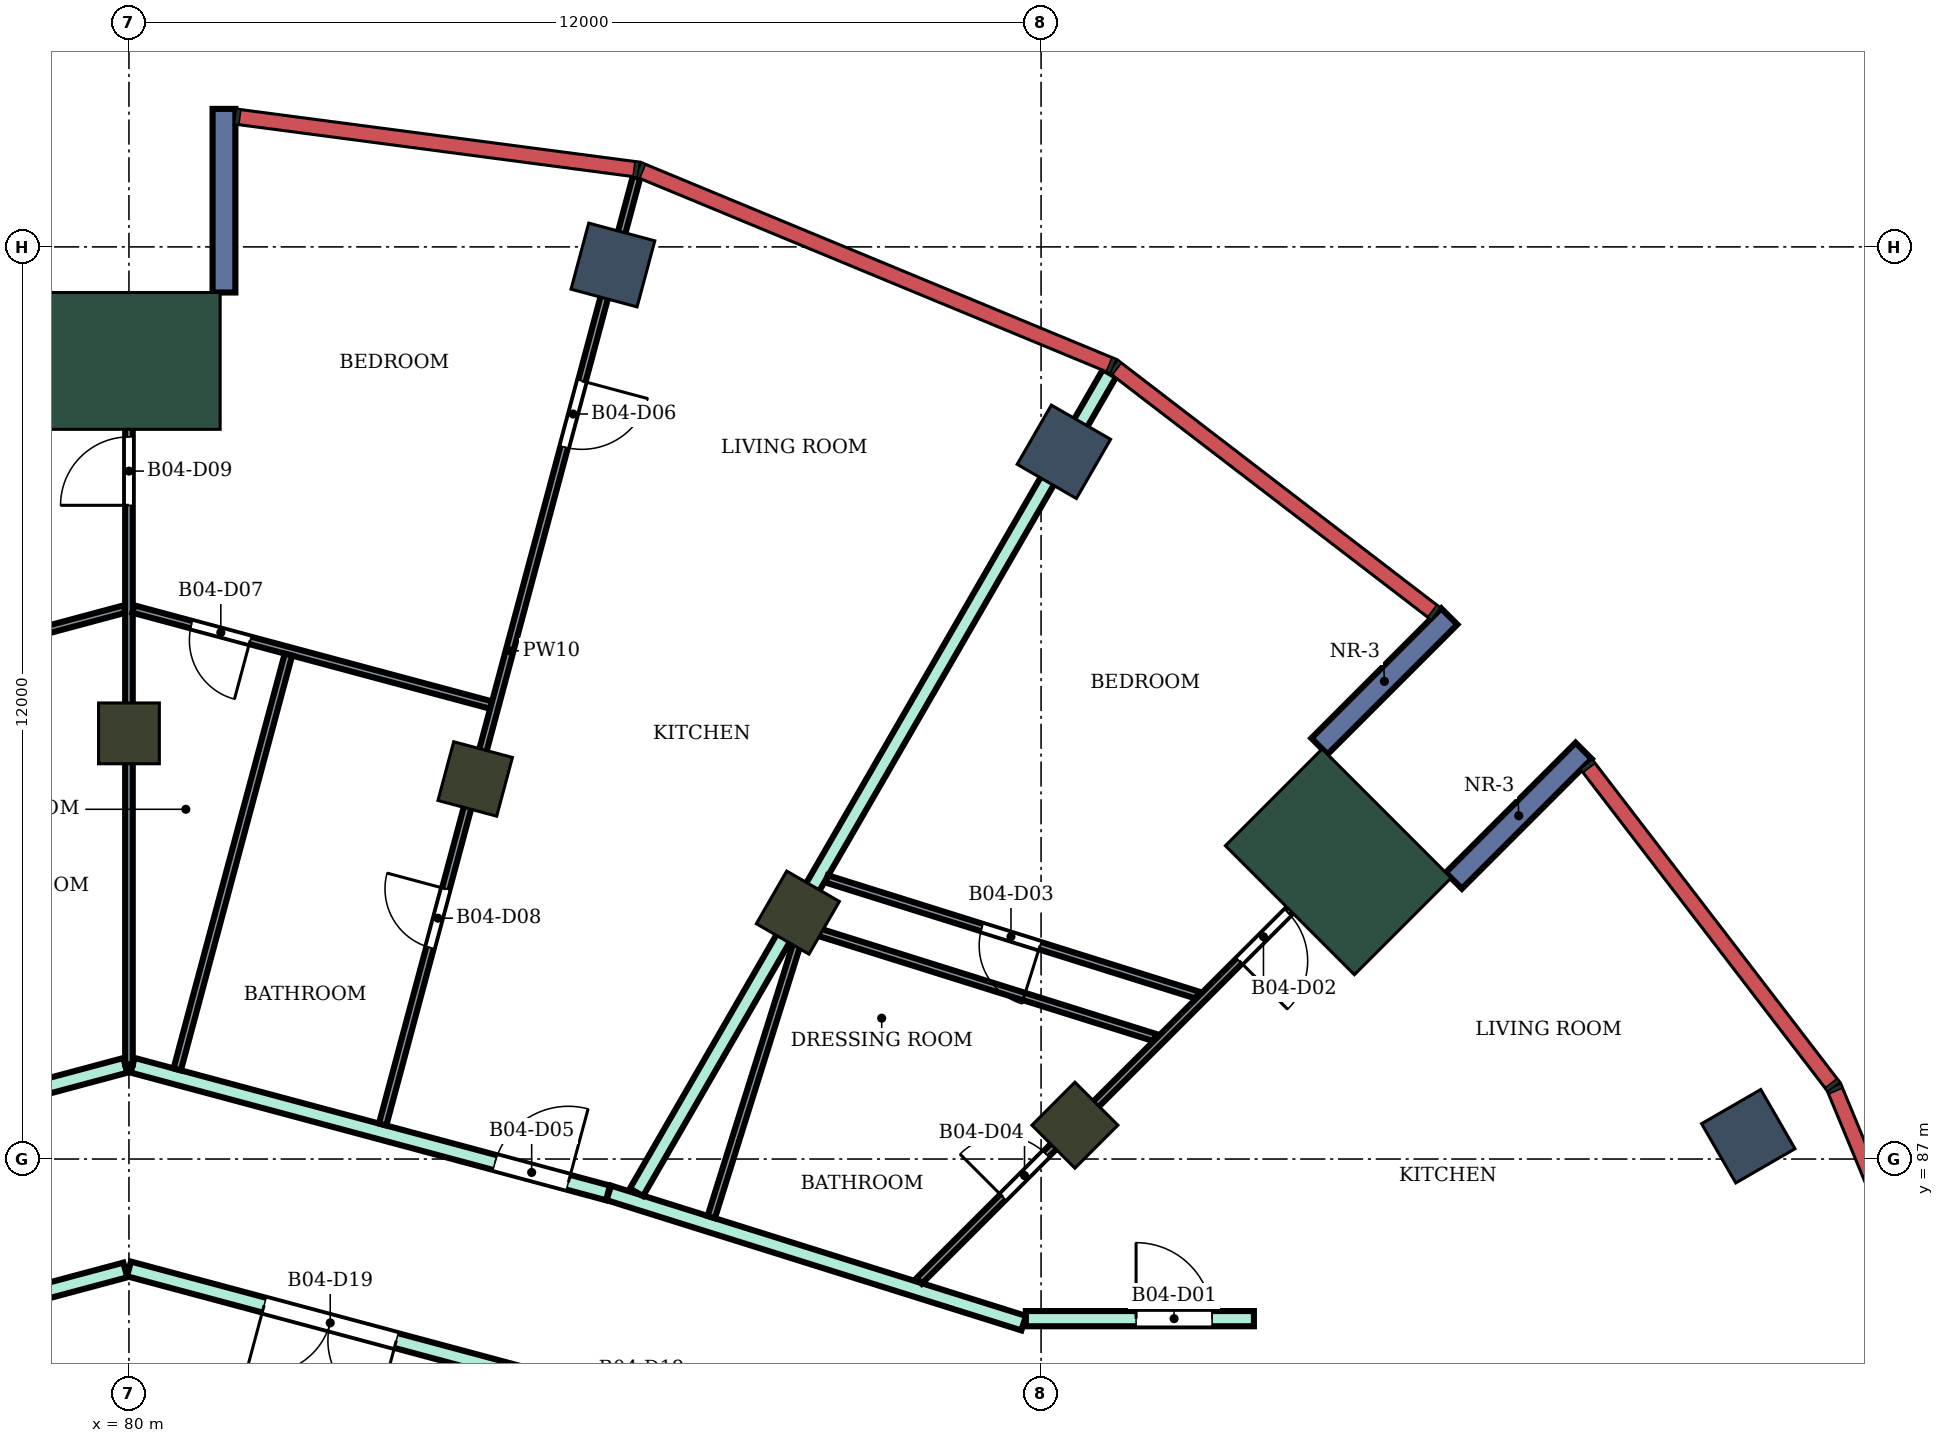
"""IFC4 building model, lengths in metres.
Left out: names, types, materials, properties, quantities, classifications, styles, units other than length and angle.
Written with IfcOpenShell. Run it as: python <this file> out.ifc"""

import sys

from ifc_helpers import new_model, si_unit, direction, frame, frame_2d, origin, origin_2d, place, context, subcontext, project, spatial, rectangle, extrude, element, fill, save


model = new_model("IFC4")
c1 = context("Model", 3, precision=1e-05, world=origin(), true_north=direction((0.0, 1.0)))
c2 = subcontext(c1, "Body", "Model", "MODEL_VIEW")
j1 = project(units=[si_unit("LENGTHUNIT", "METRE"), si_unit("PLANEANGLEUNIT", "RADIAN")], contexts=[c1])
p1 = place(None, origin())
s1 = spatial("IfcSite", under=j1, at=p1, CompositionType="ELEMENT")
p2 = place(p1, origin())
s2 = spatial("IfcBuilding", under=s1, at=p2, CompositionType="ELEMENT")
p3 = place(p2, frame((0.0, 0.0, 258.3)))
s3 = spatial("IfcBuildingStorey", under=s2, at=p3, CompositionType="ELEMENT", Elevation=258.3)
for number, where, z_axis, x_axis in (
    (1, (101.304, 87.3, 0.0), (0.0, 0.0, 1.0), (0.866, 0.5, 0.0)),
    (2, (92.3, 96.304, 0.0), (0.0, 0.0, 1.0), (0.5, 0.866, 0.0)),
    (3, (86.367, 98.762, 0.0), (0.0, 0.0, 1.0), (0.259, 0.966, 0.0)),
):
    element("IfcColumn", number, at=place(p3, frame(where, z_axis=z_axis, x_axis=x_axis)), inside=s3, PredefinedType="COLUMN", context=c2, shape_type="SweptSolid", body=[
        extrude(rectangle(XDim=0.9, YDim=0.9, at=origin_2d()), origin(), (0.0, 0.0, 1.0), 4.2),
    ])
for number, where, z_axis, x_axis in (
    (4, (92.445, 87.445, 0.0), (0.0, 0.0, 1.0), (0.707, 0.707, 0.0)),
    (5, (88.8, 90.242, 0.0), (0.0, 0.0, 1.0), (0.5, 0.866, 0.0)),
    (6, (84.555, 92.0, 0.0), (0.0, 0.0, 1.0), (0.259, 0.966, 0.0)),
    (7, (80.0, 92.6, 0.0), (0.0, 0.0, 1.0), (0.0, 1.0, 0.0)),
):
    element("IfcColumn", number, at=place(p3, frame(where, z_axis=z_axis, x_axis=x_axis)), inside=s3, PredefinedType="COLUMN", context=c2, shape_type="SweptSolid", body=[
        extrude(rectangle(XDim=0.8, YDim=0.8, at=origin_2d()), origin(), (0.0, 0.0, 1.0), 4.2),
    ])
for number, where, z_axis, x_axis in (
    (8, (95.91, 90.91, 0.0), (0.0, 0.0, 1.0), (0.707, 0.707, 0.0)),
    (9, (80.0, 97.5, 0.0), (0.0, 0.0, 1.0), (0.0, 1.0, 0.0)),
):
    element("IfcColumn", number, at=place(p3, frame(where, z_axis=z_axis, x_axis=x_axis)), inside=s3, PredefinedType="COLUMN", context=c2, shape_type="SweptSolid", body=[
        extrude(rectangle(XDim=1.8, YDim=2.4, at=origin_2d()), origin(), (0.0, 0.0, 1.0), 4.2),
    ])
for number, where, z_axis, x_axis in (
    (10, (97.43, 90.662, 0.0), (0.0, 0.0, 1.0), (0.707, 0.707, 0.0)),
    (11, (95.662, 92.43, 0.0), (0.0, 0.0, 1.0), (0.707, 0.707, 0.0)),
    (12, (81.25, 98.4, 0.0), (0.0, 0.0, 1.0), (0.0, 1.0, 0.0)),
):
    element("IfcWall", number, at=place(p3, frame(where, z_axis=z_axis, x_axis=x_axis)), inside=s3, PredefinedType="NOTDEFINED", context=c2, shape_type="SweptSolid", body=[
        extrude(rectangle(XDim=2.416, YDim=0.3, at=frame_2d((1.208, 0.0))), origin(), (0.0, 0.0, 1.0), 4.2),
    ])
p4 = place(p3, frame((73.687, 86.554, 0.0), z_axis=(0.0, 0.0, 1.0), x_axis=(0.965961994098, 0.258684027257, 0.0)))
e13 = element("IfcWall", 13, at=p4, inside=s3, PredefinedType="PARTITIONING", context=c2, shape_type="SweptSolid", body=[
    extrude(rectangle(XDim=6.486, YDim=0.2, at=frame_2d((3.243, 0.0))), origin(), (0.0, 0.0, 1.0), 3.75),
])
p5 = place(p4, frame((0.55, 0.0, 0.0)))
e14 = element("IfcOpeningElement", 14, at=p5, cuts=e13, PredefinedType="OPENING", context=c2, shape_type="SweptSolid", body=[
    extrude(rectangle(XDim=1.0, YDim=2.1, at=frame_2d((0.5, 1.05))), frame((0.0, 0.11, 0.0), z_axis=(0.0, -1.0, 0.0), x_axis=(1.0, 0.0, 0.0)), (0.0, 0.0, 1.0), 0.22),
])
p6 = place(p3, frame((74.413, 84.057, 0.0), z_axis=(0.0, 0.0, 1.0), x_axis=(0.965970849692, 0.258650956976, 0.0)))
e15 = element("IfcWall", 15, at=p6, inside=s3, PredefinedType="PARTITIONING", context=c2, shape_type="SweptSolid", body=[
    extrude(rectangle(XDim=5.734, YDim=0.2, at=frame_2d((2.867, 0.0))), origin(), (0.0, 0.0, 1.0), 3.75),
])
p7 = place(p3, frame((80.0, 85.554, 0.0), z_axis=(0.0, 0.0, 1.0), x_axis=(0.965894438951, -0.258936155845, 0.0)))
e16 = element("IfcWall", 16, at=p7, inside=s3, PredefinedType="PARTITIONING", context=c2, shape_type="SweptSolid", body=[
    extrude(rectangle(XDim=5.774, YDim=0.2, at=frame_2d((2.887, 0.0))), origin(), (0.0, 0.0, 1.0), 3.75),
])
p8 = place(p7, frame((1.841, 0.0, 0.0)))
e17 = element("IfcOpeningElement", 17, at=p8, cuts=e16, PredefinedType="OPENING", context=c2, shape_type="SweptSolid", body=[
    extrude(rectangle(XDim=1.8, YDim=2.1, at=frame_2d((0.9, 1.05))), frame((0.0, 0.11, 0.0), z_axis=(0.0, -1.0, 0.0), x_axis=(1.0, 0.0, 0.0)), (0.0, 0.0, 1.0), 0.22),
])
p9 = place(p3, frame((80.048, 88.233, 0.0), z_axis=(0.0, 0.0, 1.0), x_axis=(0.965787353661, -0.259335280109, 0.0)))
e18 = element("IfcWall", 18, at=p9, inside=s3, PredefinedType="PARTITIONING", context=c2, shape_type="SweptSolid", body=[
    extrude(rectangle(XDim=6.476, YDim=0.2, at=frame_2d((3.238, 0.0))), origin(), (0.0, 0.0, 1.0), 3.75),
])
p10 = place(p9, frame((4.936, 0.0, 0.0)))
e19 = element("IfcOpeningElement", 19, at=p10, cuts=e18, PredefinedType="OPENING", context=c2, shape_type="SweptSolid", body=[
    extrude(rectangle(XDim=1.0, YDim=2.1, at=frame_2d((0.5, 1.05))), frame((0.0, 0.11, 0.0), z_axis=(0.0, -1.0, 0.0), x_axis=(1.0, 0.0, 0.0)), (0.0, 0.0, 1.0), 0.22),
])
p11 = place(p3, frame((86.313, 86.554, 0.0), z_axis=(0.0, 0.0, 1.0), x_axis=(0.954077387881, -0.29956024091, 0.0)))
e20 = element("IfcWall", 20, at=p11, inside=s3, PredefinedType="PARTITIONING", context=c2, shape_type="SweptSolid", body=[
    extrude(rectangle(XDim=5.72, YDim=0.2, at=frame_2d((2.86, 0.0))), origin(), (0.0, 0.0, 1.0), 3.75),
])
p12 = place(p3, frame((86.677, 86.562, 0.0), z_axis=(0.0, 0.0, 1.0), x_axis=(0.500139020429, 0.865945125424, 0.0)))
e21 = element("IfcWall", 21, at=p12, inside=s3, PredefinedType="PARTITIONING", context=c2, shape_type="SweptSolid", body=[
    extrude(rectangle(XDim=12.446, YDim=0.2, at=frame_2d((6.223, 0.0))), origin(), (0.0, 0.0, 1.0), 3.75),
])
p13 = place(p3, frame((91.8, 84.9, 0.0), z_axis=(0.0, 0.0, 1.0), x_axis=(1.0, 0.0, 0.0)))
e22 = element("IfcWall", 22, at=p13, inside=s3, PredefinedType="PARTITIONING", context=c2, shape_type="SweptSolid", body=[
    extrude(rectangle(XDim=3.0, YDim=0.2, at=frame_2d((1.5, 0.0))), origin(), (0.0, 0.0, 1.0), 3.75),
])
p14 = place(p13, frame((1.45, 0.0, 0.0)))
e23 = element("IfcOpeningElement", 23, at=p14, cuts=e22, PredefinedType="OPENING", context=c2, shape_type="SweptSolid", body=[
    extrude(rectangle(XDim=1.0, YDim=2.1, at=frame_2d((0.5, 1.05))), frame((0.0, 0.11, 0.0), z_axis=(0.0, -1.0, 0.0), x_axis=(1.0, 0.0, 0.0)), (0.0, 0.0, 1.0), 0.22),
])
p15 = place(p3, frame((75.294, 92.989, 0.0), z_axis=(0.0, 0.0, 1.0), x_axis=(0.965836333205, 0.259152807165, 0.0)))
e24 = element("IfcWall", 24, at=p15, inside=s3, PredefinedType="PARTITIONING", context=c2, shape_type="SweptSolid", body=[
    extrude(rectangle(XDim=4.812, YDim=0.1, at=frame_2d((2.406, 0.0))), origin(), (0.0, 0.0, 1.0), 3.75),
])
p16 = place(p15, frame((1.981, 0.0, 0.0)))
e25 = element("IfcOpeningElement", 25, at=p16, cuts=e24, PredefinedType="OPENING", context=c2, shape_type="SweptSolid", body=[
    extrude(rectangle(XDim=0.8, YDim=2.1, at=frame_2d((0.4, 1.05))), frame((0.0, 0.06, 0.0), z_axis=(0.0, -1.0, 0.0), x_axis=(1.0, 0.0, 0.0)), (0.0, 0.0, 1.0), 0.12),
])
p17 = place(p3, frame((80.0, 88.246, 0.0), z_axis=(0.0, 0.0, 1.0), x_axis=(0.0, 1.0, 0.0)))
e26 = element("IfcWall", 26, at=p17, inside=s3, PredefinedType="PARTITIONING", context=c2, shape_type="SweptSolid", body=[
    extrude(rectangle(XDim=9.954, YDim=0.1, at=frame_2d((4.977, 0.0))), origin(), (0.0, 0.0, 1.0), 3.75),
])
p18 = place(p17, frame((7.354, 0.0, 0.0)))
e27 = element("IfcOpeningElement", 27, at=p18, cuts=e26, PredefinedType="OPENING", context=c2, shape_type="SweptSolid", body=[
    extrude(rectangle(XDim=0.9, YDim=2.1, at=frame_2d((0.45, 1.05))), frame((0.0, 0.06, 0.0), z_axis=(0.0, -1.0, 0.0), x_axis=(1.0, 0.0, 0.0)), (0.0, 0.0, 1.0), 0.12),
])
p19 = place(p3, frame((80.058, 94.235, 0.0), z_axis=(0.0, 0.0, 1.0), x_axis=(0.965831212389, -0.259171891173, 0.0)))
e28 = element("IfcWall", 28, at=p19, inside=s3, PredefinedType="PARTITIONING", context=c2, shape_type="SweptSolid", body=[
    extrude(rectangle(XDim=4.872, YDim=0.1, at=frame_2d((2.436, 0.0))), origin(), (0.0, 0.0, 1.0), 3.75),
])
p20 = place(p19, frame((0.792, 0.0, 0.0)))
e29 = element("IfcOpeningElement", 29, at=p20, cuts=e28, PredefinedType="OPENING", context=c2, shape_type="SweptSolid", body=[
    extrude(rectangle(XDim=0.8, YDim=2.1, at=frame_2d((0.4, 1.05))), frame((0.0, 0.06, 0.0), z_axis=(0.0, -1.0, 0.0), x_axis=(1.0, 0.0, 0.0)), (0.0, 0.0, 1.0), 0.12),
])
p21 = place(p3, frame((80.635, 88.179, 0.0), z_axis=(0.0, 0.0, 1.0), x_axis=(0.258942728312, 0.965892676986, 0.0)))
e30 = element("IfcWall", 30, at=p21, inside=s3, PredefinedType="PARTITIONING", context=c2, shape_type="SweptSolid", body=[
    extrude(rectangle(XDim=5.649, YDim=0.1, at=frame_2d((2.825, 0.0))), origin(), (0.0, 0.0, 1.0), 3.75),
])
p22 = place(p3, frame((83.338, 87.455, 0.0), z_axis=(0.0, 0.0, 1.0), x_axis=(0.25886596283, 0.965913253501, 0.0)))
e31 = element("IfcWall", 31, at=p22, inside=s3, PredefinedType="PARTITIONING", context=c2, shape_type="SweptSolid", body=[
    extrude(rectangle(XDim=12.904, YDim=0.1, at=frame_2d((6.452, 0.0))), origin(), (0.0, 0.0, 1.0), 3.75),
])
p23 = place(p22, frame((9.227, 0.0, 0.0)))
e32 = element("IfcOpeningElement", 32, at=p23, cuts=e31, PredefinedType="OPENING", context=c2, shape_type="SweptSolid", body=[
    extrude(rectangle(XDim=0.9, YDim=2.1, at=frame_2d((0.45, 1.05))), frame((0.0, 0.06, 0.0), z_axis=(0.0, -1.0, 0.0), x_axis=(1.0, 0.0, 0.0)), (0.0, 0.0, 1.0), 0.12),
])
p24 = place(p22, frame((2.409, 0.0, 0.0)))
e33 = element("IfcOpeningElement", 33, at=p24, cuts=e31, PredefinedType="OPENING", context=c2, shape_type="SweptSolid", body=[
    extrude(rectangle(XDim=0.8, YDim=2.1, at=frame_2d((0.4, 1.05))), frame((0.0, 0.06, 0.0), z_axis=(0.0, -1.0, 0.0), x_axis=(1.0, 0.0, 0.0)), (0.0, 0.0, 1.0), 0.12),
])
p25 = place(p3, frame((87.661, 86.236, 0.0), z_axis=(0.0, 0.0, 1.0), x_axis=(0.299267255743, 0.954169329648, 0.0)))
e34 = element("IfcWall", 34, at=p25, inside=s3, PredefinedType="PARTITIONING", context=c2, shape_type="SweptSolid", body=[
    extrude(rectangle(XDim=3.95, YDim=0.1, at=frame_2d((1.975, 0.0))), origin(), (0.0, 0.0, 1.0), 3.75),
])
p26 = place(p3, frame((88.858, 90.053, 0.0), z_axis=(0.0, 0.0, 1.0), x_axis=(0.954180222183, -0.299232524294, 0.0)))
e35 = element("IfcWall", 35, at=p26, inside=s3, PredefinedType="PARTITIONING", context=c2, shape_type="SweptSolid", body=[
    extrude(rectangle(XDim=4.863, YDim=0.1, at=frame_2d((2.431, 0.0))), origin(), (0.0, 0.0, 1.0), 3.75),
])
p27 = place(p3, frame((89.18, 90.685, 0.0), z_axis=(0.0, 0.0, 1.0), x_axis=(0.954251036713, -0.299006620215, 0.0)))
e36 = element("IfcWall", 36, at=p27, inside=s3, PredefinedType="PARTITIONING", context=c2, shape_type="SweptSolid", body=[
    extrude(rectangle(XDim=5.111, YDim=0.1, at=frame_2d((2.555, 0.0))), origin(), (0.0, 0.0, 1.0), 3.75),
])
p28 = place(p27, frame((2.14, 0.0, 0.0)))
e37 = element("IfcOpeningElement", 37, at=p28, cuts=e36, PredefinedType="OPENING", context=c2, shape_type="SweptSolid", body=[
    extrude(rectangle(XDim=0.8, YDim=2.1, at=frame_2d((0.4, 1.05))), frame((0.0, 0.06, 0.0), z_axis=(0.0, -1.0, 0.0), x_axis=(1.0, 0.0, 0.0)), (0.0, 0.0, 1.0), 0.12),
])
p29 = place(p3, frame((90.395, 85.395, 0.0), z_axis=(0.0, 0.0, 1.0), x_axis=(0.707279106146, 0.706934414221, 0.0)))
e38 = element("IfcWall", 38, at=p29, inside=s3, PredefinedType="PARTITIONING", context=c2, shape_type="SweptSolid", body=[
    extrude(rectangle(XDim=8.5, YDim=0.1, at=frame_2d((4.25, 0.0))), origin(), (0.0, 0.0, 1.0), 3.75),
])
p30 = place(p29, frame((5.957, 0.0, 0.0)))
e39 = element("IfcOpeningElement", 39, at=p30, cuts=e38, PredefinedType="OPENING", context=c2, shape_type="SweptSolid", body=[
    extrude(rectangle(XDim=0.9, YDim=2.1, at=frame_2d((0.45, 1.05))), frame((0.0, 0.06, 0.0), z_axis=(0.0, -1.0, 0.0), x_axis=(1.0, 0.0, 0.0)), (0.0, 0.0, 1.0), 0.12),
])
p31 = place(p29, frame((1.562, 0.0, 0.0)))
e40 = element("IfcOpeningElement", 40, at=p31, cuts=e38, PredefinedType="OPENING", context=c2, shape_type="SweptSolid", body=[
    extrude(rectangle(XDim=0.8, YDim=2.1, at=frame_2d((0.4, 1.05))), frame((0.0, 0.06, 0.0), z_axis=(0.0, -1.0, 0.0), x_axis=(1.0, 0.0, 0.0)), (0.0, 0.0, 1.0), 0.12),
])
p32 = place(p14, origin())
e41 = element("IfcDoor", 41, at=p32, inside=s3, OperationType="SINGLE_SWING_LEFT", PredefinedType="DOOR", context=c2, shape_type="SweptSolid", body=[
    extrude(rectangle(XDim=1.0, YDim=2.1, at=frame_2d((0.5, 1.05))), frame((0.0, 0.025, 0.0), z_axis=(0.0, -1.0, 0.0), x_axis=(1.0, 0.0, 0.0)), (0.0, 0.0, 1.0), 0.05),
])
fill(e23, e41)
p33 = place(p30, frame((0.9, 0.0, 0.0), z_axis=(0.0, 0.0, 1.0), x_axis=(-1.0, 0.0, 0.0)))
e42 = element("IfcDoor", 42, at=p33, inside=s3, OperationType="SINGLE_SWING_RIGHT", PredefinedType="DOOR", context=c2, shape_type="SweptSolid", body=[
    extrude(rectangle(XDim=0.9, YDim=2.1, at=frame_2d((0.45, 1.05))), frame((0.0, 0.025, 0.0), z_axis=(0.0, -1.0, 0.0), x_axis=(1.0, 0.0, 0.0)), (0.0, 0.0, 1.0), 0.05),
])
fill(e39, e42)
p34 = place(p28, frame((0.8, 0.0, 0.0), z_axis=(0.0, 0.0, 1.0), x_axis=(-1.0, 0.0, 0.0)))
e43 = element("IfcDoor", 43, at=p34, inside=s3, OperationType="SINGLE_SWING_LEFT", PredefinedType="DOOR", context=c2, shape_type="SweptSolid", body=[
    extrude(rectangle(XDim=0.8, YDim=2.1, at=frame_2d((0.4, 1.05))), frame((0.0, 0.025, 0.0), z_axis=(0.0, -1.0, 0.0), x_axis=(1.0, 0.0, 0.0)), (0.0, 0.0, 1.0), 0.05),
])
fill(e37, e43)
p35 = place(p31, origin())
e44 = element("IfcDoor", 44, at=p35, inside=s3, OperationType="SINGLE_SWING_LEFT", PredefinedType="DOOR", context=c2, shape_type="SweptSolid", body=[
    extrude(rectangle(XDim=0.8, YDim=2.1, at=frame_2d((0.4, 1.05))), frame((0.0, 0.025, 0.0), z_axis=(0.0, -1.0, 0.0), x_axis=(1.0, 0.0, 0.0)), (0.0, 0.0, 1.0), 0.05),
])
fill(e40, e44)
p36 = place(p10, origin())
e45 = element("IfcDoor", 45, at=p36, inside=s3, OperationType="SINGLE_SWING_RIGHT", PredefinedType="DOOR", context=c2, shape_type="SweptSolid", body=[
    extrude(rectangle(XDim=1.0, YDim=2.1, at=frame_2d((0.5, 1.05))), frame((0.0, 0.025, 0.0), z_axis=(0.0, -1.0, 0.0), x_axis=(1.0, 0.0, 0.0)), (0.0, 0.0, 1.0), 0.05),
])
fill(e19, e45)
p37 = place(p23, frame((0.9, 0.0, 0.0), z_axis=(0.0, 0.0, 1.0), x_axis=(-1.0, 0.0, 0.0)))
e46 = element("IfcDoor", 46, at=p37, inside=s3, OperationType="SINGLE_SWING_LEFT", PredefinedType="DOOR", context=c2, shape_type="SweptSolid", body=[
    extrude(rectangle(XDim=0.9, YDim=2.1, at=frame_2d((0.45, 1.05))), frame((0.0, 0.025, 0.0), z_axis=(0.0, -1.0, 0.0), x_axis=(1.0, 0.0, 0.0)), (0.0, 0.0, 1.0), 0.05),
])
fill(e32, e46)
p38 = place(p20, frame((0.8, 0.0, 0.0), z_axis=(0.0, 0.0, 1.0), x_axis=(-1.0, 0.0, 0.0)))
e47 = element("IfcDoor", 47, at=p38, inside=s3, OperationType="SINGLE_SWING_LEFT", PredefinedType="DOOR", context=c2, shape_type="SweptSolid", body=[
    extrude(rectangle(XDim=0.8, YDim=2.1, at=frame_2d((0.4, 1.05))), frame((0.0, 0.025, 0.0), z_axis=(0.0, -1.0, 0.0), x_axis=(1.0, 0.0, 0.0)), (0.0, 0.0, 1.0), 0.05),
])
fill(e29, e47)
p39 = place(p24, origin())
e48 = element("IfcDoor", 48, at=p39, inside=s3, OperationType="SINGLE_SWING_RIGHT", PredefinedType="DOOR", context=c2, shape_type="SweptSolid", body=[
    extrude(rectangle(XDim=0.8, YDim=2.1, at=frame_2d((0.4, 1.05))), frame((0.0, 0.025, 0.0), z_axis=(0.0, -1.0, 0.0), x_axis=(1.0, 0.0, 0.0)), (0.0, 0.0, 1.0), 0.05),
])
fill(e33, e48)
p40 = place(p18, origin())
e49 = element("IfcDoor", 49, at=p40, inside=s3, OperationType="SINGLE_SWING_LEFT", PredefinedType="DOOR", context=c2, shape_type="SweptSolid", body=[
    extrude(rectangle(XDim=0.9, YDim=2.1, at=frame_2d((0.45, 1.05))), frame((0.0, 0.025, 0.0), z_axis=(0.0, -1.0, 0.0), x_axis=(1.0, 0.0, 0.0)), (0.0, 0.0, 1.0), 0.05),
])
fill(e27, e49)
p41 = place(p8, frame((1.8, 0.0, 0.0), z_axis=(0.0, 0.0, 1.0), x_axis=(-1.0, 0.0, 0.0)))
e50 = element("IfcDoor", 50, at=p41, inside=s3, OperationType="DOUBLE_DOOR_SINGLE_SWING", PredefinedType="DOOR", context=c2, shape_type="SweptSolid", body=[
    extrude(rectangle(XDim=1.8, YDim=2.1, at=frame_2d((0.9, 1.05))), frame((0.0, 0.025, 0.0), z_axis=(0.0, -1.0, 0.0), x_axis=(1.0, 0.0, 0.0)), (0.0, 0.0, 1.0), 0.05),
])
fill(e17, e50)
save(model, sys.argv[1])
